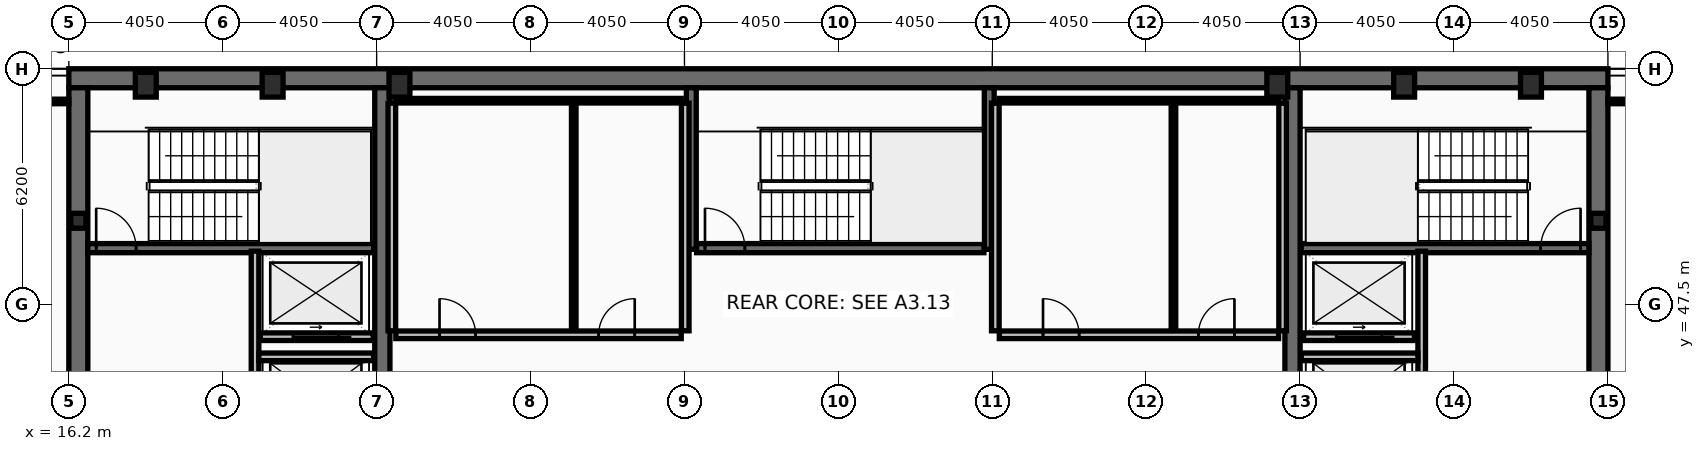
"""IFC4 building model, lengths in metres.
Left out: names, types, materials, properties, quantities, classifications, styles, units other than length and angle.
Written with IfcOpenShell. Run it as: python <this file> out.ifc"""

import sys

from ifc_helpers import new_model, si_unit, direction, frame, frame_2d, origin, origin_2d, place, context, subcontext, project, spatial, rectangle, hollow_rectangle, i_section, extrude, element, fill, save


model = new_model("IFC4")
c1 = context("Model", 3, precision=1e-05, world=origin(), true_north=direction((0.0, 1.0)))
c2 = subcontext(c1, "Body", "Model", "MODEL_VIEW")
j1 = project(units=[si_unit("LENGTHUNIT", "METRE"), si_unit("PLANEANGLEUNIT", "RADIAN")], contexts=[c1])
p1 = place(None, origin())
s1 = spatial("IfcSite", under=j1, at=p1, CompositionType="ELEMENT")
p2 = place(p1, origin())
s2 = spatial("IfcBuilding", under=s1, at=p2, CompositionType="ELEMENT")
p3 = place(p2, frame((0.0, 0.0, 314.6)))
s3 = spatial("IfcBuildingStorey", under=s2, at=p3, CompositionType="ELEMENT", Elevation=314.6)
p4 = place(p3, frame((16.2, 53.45, 0.0), z_axis=(0.0, 0.0, 1.0), x_axis=(1.0, 0.0, 0.0)))
e1 = element("IfcWall", 1, at=p4, inside=s3, PredefinedType="SHEAR", context=c2, shape_type="SweptSolid", body=[
    extrude(rectangle(XDim=40.5, YDim=0.5, at=frame_2d((20.25, 0.0))), origin(), (0.0, 0.0, 1.0), 3.44),
])
for number, where, z_axis, x_axis in (
    (2, (16.45, 41.8, 0.0), (0.0, 0.0, 1.0), (0.0, 1.0, 0.0)),
    (3, (56.45, 53.2, 0.0), (0.0, 0.0, 1.0), (0.0, -1.0, 0.0)),
):
    element("IfcWall", number, at=place(p3, frame(where, z_axis=z_axis, x_axis=x_axis)), inside=s3, PredefinedType="SHEAR", context=c2, shape_type="SweptSolid", body=[
        extrude(rectangle(XDim=11.4, YDim=0.5, at=frame_2d((5.7, 0.0))), origin(), (0.0, 0.0, 1.0), 3.44),
    ])
for number, where, z_axis, x_axis in (
    (4, (24.45, 41.8, 0.0), (0.0, 0.0, 1.0), (0.0, 1.0, 0.0)),
    (5, (48.4, 41.8, 0.0), (0.0, 0.0, 1.0), (0.0, 1.0, 0.0)),
):
    element("IfcWall", number, at=place(p3, frame(where, z_axis=z_axis, x_axis=x_axis)), inside=s3, PredefinedType="SHEAR", context=c2, shape_type="SweptSolid", body=[
        extrude(rectangle(XDim=11.4, YDim=0.4, at=frame_2d((5.7, 0.0))), origin(), (0.0, 0.0, 1.0), 3.44),
    ])
for number, where, z_axis, x_axis in (
    (6, (32.58, 48.95, 0.0), (0.0, 0.0, 1.0), (0.0, 1.0, 0.0)),
    (7, (40.42, 48.95, 0.0), (0.0, 0.0, 1.0), (0.0, 1.0, 0.0)),
):
    element("IfcWall", number, at=place(p3, frame(where, z_axis=z_axis, x_axis=x_axis)), inside=s3, PredefinedType="SHEAR", context=c2, shape_type="SweptSolid", body=[
        extrude(rectangle(XDim=4.25, YDim=0.26, at=frame_2d((2.125, 0.0))), origin(), (0.0, 0.0, 1.0), 3.44),
    ])
p5 = place(p3, frame((16.7, 48.98, 0.0), z_axis=(0.0, 0.0, 1.0), x_axis=(1.0, 0.0, 0.0)))
e8 = element("IfcWall", 8, at=p5, inside=s3, PredefinedType="SHEAR", context=c2, shape_type="SweptSolid", body=[
    extrude(rectangle(XDim=7.52, YDim=0.24, at=frame_2d((3.76, 0.0))), origin(), (0.0, 0.0, 1.0), 3.44),
])
p6 = place(p5, frame((0.22, 0.0, 0.0)))
e9 = element("IfcOpeningElement", 9, at=p6, cuts=e8, PredefinedType="OPENING", context=c2, shape_type="SweptSolid", body=[
    extrude(rectangle(XDim=1.05, YDim=2.15, at=frame_2d((0.525, 1.075))), frame((0.0, 0.13, 0.0), z_axis=(0.0, -1.0, 0.0), x_axis=(1.0, 0.0, 0.0)), (0.0, 0.0, 1.0), 0.26),
])
p7 = place(p3, frame((48.63, 48.98, 0.0), z_axis=(0.0, 0.0, 1.0), x_axis=(1.0, 0.0, 0.0)))
e10 = element("IfcWall", 10, at=p7, inside=s3, PredefinedType="SHEAR", context=c2, shape_type="SweptSolid", body=[
    extrude(rectangle(XDim=7.57, YDim=0.24, at=frame_2d((3.785, 0.0))), origin(), (0.0, 0.0, 1.0), 3.44),
])
p8 = place(p7, frame((6.3, 0.0, 0.0)))
e11 = element("IfcOpeningElement", 11, at=p8, cuts=e10, PredefinedType="OPENING", context=c2, shape_type="SweptSolid", body=[
    extrude(rectangle(XDim=1.05, YDim=2.15, at=frame_2d((0.525, 1.075))), frame((0.0, 0.13, 0.0), z_axis=(0.0, -1.0, 0.0), x_axis=(1.0, 0.0, 0.0)), (0.0, 0.0, 1.0), 0.26),
])
p9 = place(p3, frame((32.72, 48.98, 0.0), z_axis=(0.0, 0.0, 1.0), x_axis=(1.0, 0.0, 0.0)))
e12 = element("IfcWall", 12, at=p9, inside=s3, PredefinedType="SHEAR", context=c2, shape_type="SweptSolid", body=[
    extrude(rectangle(XDim=7.56, YDim=0.24, at=frame_2d((3.78, 0.0))), origin(), (0.0, 0.0, 1.0), 3.44),
])
p10 = place(p9, frame((0.22, 0.0, 0.0)))
e13 = element("IfcOpeningElement", 13, at=p10, cuts=e12, PredefinedType="OPENING", context=c2, shape_type="SweptSolid", body=[
    extrude(rectangle(XDim=1.05, YDim=2.15, at=frame_2d((0.525, 1.075))), frame((0.0, 0.13, 0.0), z_axis=(0.0, -1.0, 0.0), x_axis=(1.0, 0.0, 0.0)), (0.0, 0.0, 1.0), 0.26),
])
for number, where, z_axis, x_axis in (
    (14, (18.225, 53.28, 0.0), (0.0, 0.0, 1.0), (1.0, 0.0, 0.0)),
    (15, (21.562, 53.28, 0.0), (0.0, 0.0, 1.0), (1.0, 0.0, 0.0)),
    (16, (24.9, 53.28, 0.0), (0.0, 0.0, 1.0), (1.0, 0.0, 0.0)),
    (17, (48.0, 53.28, 0.0), (0.0, 0.0, 1.0), (1.0, 0.0, 0.0)),
    (18, (51.337, 53.28, 0.0), (0.0, 0.0, 1.0), (1.0, 0.0, 0.0)),
    (19, (54.675, 53.28, 0.0), (0.0, 0.0, 1.0), (1.0, 0.0, 0.0)),
):
    element("IfcColumn", number, at=place(p3, frame(where, z_axis=z_axis, x_axis=x_axis)), inside=s3, PredefinedType="COLUMN", context=c2, shape_type="SweptSolid", body=[
        extrude(hollow_rectangle(XDim=0.55, YDim=0.65, WallThickness=0.04, at=origin_2d()), origin(), (0.0, 0.0, 1.0), 3.6),
    ])
for number, where, z_axis, x_axis in (
    (20, (16.45, 49.7, 0.0), (0.0, 0.0, 1.0), (1.0, 0.0, 0.0)),
    (21, (56.45, 49.7, 0.0), (0.0, 0.0, 1.0), (1.0, 0.0, 0.0)),
):
    element("IfcColumn", number, at=place(p3, frame(where, z_axis=z_axis, x_axis=x_axis)), inside=s3, PredefinedType="COLUMN", context=c2, shape_type="SweptSolid", body=[
        extrude(i_section(OverallWidth=0.399, OverallDepth=0.393, WebThickness=0.023, FlangeThickness=0.037, at=origin_2d()), origin(), (0.0, 0.0, 1.0), 3.6),
    ])
p11 = place(p3, frame((51.61, 46.65, 0.0), z_axis=(0.0, 0.0, 1.0), x_axis=(-1.0, 0.0, 0.0)))
e22 = element("IfcWall", 22, at=p11, inside=s3, PredefinedType="PARTITIONING", context=c2, shape_type="SweptSolid", body=[
    extrude(rectangle(XDim=2.92, YDim=0.2, at=frame_2d((1.46, 0.0))), origin(), (0.0, 0.0, 1.0), 3.44),
])
p12 = place(p11, frame((0.86, 0.0, 0.0)))
e23 = element("IfcOpeningElement", 23, at=p12, cuts=e22, PredefinedType="OPENING", context=c2, shape_type="SweptSolid", body=[
    extrude(rectangle(XDim=1.2, YDim=2.18, at=frame_2d((0.6, 1.09))), frame((0.0, 0.11, 0.0), z_axis=(0.0, -1.0, 0.0), x_axis=(1.0, 0.0, 0.0)), (0.0, 0.0, 1.0), 0.22),
])
p13 = place(p3, frame((24.21, 46.65, 0.0), z_axis=(0.0, 0.0, 1.0), x_axis=(-1.0, 0.0, 0.0)))
e24 = element("IfcWall", 24, at=p13, inside=s3, PredefinedType="PARTITIONING", context=c2, shape_type="SweptSolid", body=[
    extrude(rectangle(XDim=2.97, YDim=0.2, at=frame_2d((1.485, 0.0))), origin(), (0.0, 0.0, 1.0), 3.44),
])
p14 = place(p13, frame((0.91, 0.0, 0.0)))
e25 = element("IfcOpeningElement", 25, at=p14, cuts=e24, PredefinedType="OPENING", context=c2, shape_type="SweptSolid", body=[
    extrude(rectangle(XDim=1.2, YDim=2.18, at=frame_2d((0.6, 1.09))), frame((0.0, 0.11, 0.0), z_axis=(0.0, -1.0, 0.0), x_axis=(1.0, 0.0, 0.0)), (0.0, 0.0, 1.0), 0.22),
])
p15 = place(p3, frame((21.1, 44.6, 0.0), z_axis=(0.0, 0.0, 1.0), x_axis=(0.0, 1.0, 0.0)))
e26 = element("IfcWall", 26, at=p15, inside=s3, PredefinedType="PARTITIONING", context=c2, shape_type="SweptSolid", body=[
    extrude(rectangle(XDim=4.3, YDim=0.2, at=frame_2d((2.15, 0.0))), origin(), (0.0, 0.0, 1.0), 3.44),
])
p16 = place(p3, frame((21.2, 46.12, 0.0), z_axis=(0.0, 0.0, 1.0), x_axis=(1.0, 0.0, 0.0)))
e27 = element("IfcWall", 27, at=p16, inside=s3, PredefinedType="PARTITIONING", context=c2, shape_type="SweptSolid", body=[
    extrude(rectangle(XDim=3.02, YDim=0.2, at=frame_2d((1.51, 0.0))), origin(), (0.0, 0.0, 1.0), 3.44),
])
p17 = place(p3, frame((51.8, 44.6, 0.0), z_axis=(0.0, 0.0, 1.0), x_axis=(0.0, 1.0, 0.0)))
e28 = element("IfcWall", 28, at=p17, inside=s3, PredefinedType="PARTITIONING", context=c2, shape_type="SweptSolid", body=[
    extrude(rectangle(XDim=4.3, YDim=0.2, at=frame_2d((2.15, 0.0))), origin(), (0.0, 0.0, 1.0), 3.44),
])
p18 = place(p3, frame((48.63, 46.12, 0.0), z_axis=(0.0, 0.0, 1.0), x_axis=(1.0, 0.0, 0.0)))
e29 = element("IfcWall", 29, at=p18, inside=s3, PredefinedType="PARTITIONING", context=c2, shape_type="SweptSolid", body=[
    extrude(rectangle(XDim=3.07, YDim=0.2, at=frame_2d((1.535, 0.0))), origin(), (0.0, 0.0, 1.0), 3.44),
])
for number, where, z_axis, x_axis in (
    (30, (24.7, 46.805, 0.0), (0.0, 0.0, 1.0), (0.0, 1.0, 0.0)),
    (31, (32.42, 46.805, 0.0), (0.0, 0.0, 1.0), (0.0, 1.0, 0.0)),
):
    element("IfcWall", number, at=place(p3, frame(where, z_axis=z_axis, x_axis=x_axis)), inside=s3, PredefinedType="PARTITIONING", context=c2, shape_type="SweptSolid", body=[
        extrude(rectangle(XDim=5.99, YDim=0.2, at=frame_2d((2.995, 0.0))), origin(), (0.0, 0.0, 1.0), 3.44),
    ])
p19 = place(p3, frame((24.805, 52.86, 0.0), z_axis=(0.0, 0.0, 1.0), x_axis=(1.0, 0.0, 0.0)))
e32 = element("IfcWall", 32, at=p19, inside=s3, PredefinedType="PARTITIONING", context=c2, shape_type="SweptSolid", body=[
    extrude(rectangle(XDim=7.51, YDim=0.12, at=frame_2d((3.755, 0.0))), origin(), (0.0, 0.0, 1.0), 3.44),
])
p20 = place(p3, frame((29.486, 46.805, 0.0), z_axis=(0.0, 0.0, 1.0), x_axis=(0.0, 1.0, 0.0)))
e33 = element("IfcWall", 33, at=p20, inside=s3, PredefinedType="PARTITIONING", context=c2, shape_type="SweptSolid", body=[
    extrude(rectangle(XDim=5.99, YDim=0.12, at=frame_2d((2.995, 0.0))), origin(), (0.0, 0.0, 1.0), 3.44),
])
p21 = place(p3, frame((24.805, 46.7, 0.0), z_axis=(0.0, 0.0, 1.0), x_axis=(1.0, 0.0, 0.0)))
e34 = element("IfcWall", 34, at=p21, inside=s3, PredefinedType="PARTITIONING", context=c2, shape_type="SweptSolid", body=[
    extrude(rectangle(XDim=7.51, YDim=0.2, at=frame_2d((3.755, 0.0))), origin(), (0.0, 0.0, 1.0), 3.44),
])
p22 = place(p21, frame((1.15, 0.0, 0.0)))
e35 = element("IfcOpeningElement", 35, at=p22, cuts=e34, PredefinedType="OPENING", context=c2, shape_type="SweptSolid", body=[
    extrude(rectangle(XDim=0.95, YDim=2.1, at=frame_2d((0.475, 1.05))), frame((0.0, 0.11, 0.0), z_axis=(0.0, -1.0, 0.0), x_axis=(1.0, 0.0, 0.0)), (0.0, 0.0, 1.0), 0.22),
])
p23 = place(p21, frame((5.336, 0.0, 0.0)))
e36 = element("IfcOpeningElement", 36, at=p23, cuts=e34, PredefinedType="OPENING", context=c2, shape_type="SweptSolid", body=[
    extrude(rectangle(XDim=0.95, YDim=2.1, at=frame_2d((0.475, 1.05))), frame((0.0, 0.11, 0.0), z_axis=(0.0, -1.0, 0.0), x_axis=(1.0, 0.0, 0.0)), (0.0, 0.0, 1.0), 0.22),
])
for number, where, z_axis, x_axis in (
    (37, (40.58, 46.805, 0.0), (0.0, 0.0, 1.0), (0.0, 1.0, 0.0)),
    (38, (48.14, 46.805, 0.0), (0.0, 0.0, 1.0), (0.0, 1.0, 0.0)),
):
    element("IfcWall", number, at=place(p3, frame(where, z_axis=z_axis, x_axis=x_axis)), inside=s3, PredefinedType="PARTITIONING", context=c2, shape_type="SweptSolid", body=[
        extrude(rectangle(XDim=5.99, YDim=0.2, at=frame_2d((2.995, 0.0))), origin(), (0.0, 0.0, 1.0), 3.44),
    ])
p24 = place(p3, frame((40.685, 52.86, 0.0), z_axis=(0.0, 0.0, 1.0), x_axis=(1.0, 0.0, 0.0)))
e39 = element("IfcWall", 39, at=p24, inside=s3, PredefinedType="PARTITIONING", context=c2, shape_type="SweptSolid", body=[
    extrude(rectangle(XDim=7.35, YDim=0.12, at=frame_2d((3.675, 0.0))), origin(), (0.0, 0.0, 1.0), 3.44),
])
p25 = place(p3, frame((45.267, 46.805, 0.0), z_axis=(0.0, 0.0, 1.0), x_axis=(0.0, 1.0, 0.0)))
e40 = element("IfcWall", 40, at=p25, inside=s3, PredefinedType="PARTITIONING", context=c2, shape_type="SweptSolid", body=[
    extrude(rectangle(XDim=5.99, YDim=0.12, at=frame_2d((2.995, 0.0))), origin(), (0.0, 0.0, 1.0), 3.44),
])
p26 = place(p3, frame((40.685, 46.7, 0.0), z_axis=(0.0, 0.0, 1.0), x_axis=(1.0, 0.0, 0.0)))
e41 = element("IfcWall", 41, at=p26, inside=s3, PredefinedType="PARTITIONING", context=c2, shape_type="SweptSolid", body=[
    extrude(rectangle(XDim=7.35, YDim=0.2, at=frame_2d((3.675, 0.0))), origin(), (0.0, 0.0, 1.0), 3.44),
])
p27 = place(p26, frame((1.15, 0.0, 0.0)))
e42 = element("IfcOpeningElement", 42, at=p27, cuts=e41, PredefinedType="OPENING", context=c2, shape_type="SweptSolid", body=[
    extrude(rectangle(XDim=0.95, YDim=2.1, at=frame_2d((0.475, 1.05))), frame((0.0, 0.11, 0.0), z_axis=(0.0, -1.0, 0.0), x_axis=(1.0, 0.0, 0.0)), (0.0, 0.0, 1.0), 0.22),
])
p28 = place(p26, frame((5.237, 0.0, 0.0)))
e43 = element("IfcOpeningElement", 43, at=p28, cuts=e41, PredefinedType="OPENING", context=c2, shape_type="SweptSolid", body=[
    extrude(rectangle(XDim=0.95, YDim=2.1, at=frame_2d((0.475, 1.05))), frame((0.0, 0.11, 0.0), z_axis=(0.0, -1.0, 0.0), x_axis=(1.0, 0.0, 0.0)), (0.0, 0.0, 1.0), 0.22),
])
for number, where, z_axis, x_axis in (
    (44, (12.095, 52.84, 0.0), (0.0, 0.0, 1.0), (1.0, 0.0, 0.0)),
    (45, (56.7, 52.84, 0.0), (0.0, 0.0, 1.0), (1.0, 0.0, 0.0)),
):
    element("IfcWall", number, at=place(p3, frame(where, z_axis=z_axis, x_axis=x_axis)), inside=s3, PredefinedType="PARTITIONING", context=c2, shape_type="SweptSolid", body=[
        extrude(rectangle(XDim=4.105, YDim=0.12, at=frame_2d((2.052, 0.0))), origin(), (0.0, 0.0, 1.0), 3.44),
    ])
p29 = place(p6, origin())
e46 = element("IfcDoor", 46, at=p29, inside=s3, OperationType="SINGLE_SWING_LEFT", PredefinedType="DOOR", context=c2, shape_type="SweptSolid", body=[
    extrude(rectangle(XDim=1.05, YDim=2.15, at=frame_2d((0.525, 1.075))), frame((0.0, 0.025, 0.0), z_axis=(0.0, -1.0, 0.0), x_axis=(1.0, 0.0, 0.0)), (0.0, 0.0, 1.0), 0.05),
])
fill(e9, e46)
p30 = place(p8, origin())
e47 = element("IfcDoor", 47, at=p30, inside=s3, OperationType="SINGLE_SWING_RIGHT", PredefinedType="DOOR", context=c2, shape_type="SweptSolid", body=[
    extrude(rectangle(XDim=1.05, YDim=2.15, at=frame_2d((0.525, 1.075))), frame((0.0, 0.025, 0.0), z_axis=(0.0, -1.0, 0.0), x_axis=(1.0, 0.0, 0.0)), (0.0, 0.0, 1.0), 0.05),
])
fill(e11, e47)
p31 = place(p10, origin())
e48 = element("IfcDoor", 48, at=p31, inside=s3, OperationType="SINGLE_SWING_LEFT", PredefinedType="DOOR", context=c2, shape_type="SweptSolid", body=[
    extrude(rectangle(XDim=1.05, YDim=2.15, at=frame_2d((0.525, 1.075))), frame((0.0, 0.025, 0.0), z_axis=(0.0, -1.0, 0.0), x_axis=(1.0, 0.0, 0.0)), (0.0, 0.0, 1.0), 0.05),
])
fill(e13, e48)
p32 = place(p12, origin())
e49 = element("IfcDoor", 49, at=p32, inside=s3, OperationType="SLIDING_TO_LEFT", PredefinedType="DOOR", context=c2, shape_type="SweptSolid", body=[
    extrude(rectangle(XDim=1.2, YDim=2.18, at=frame_2d((0.6, 1.09))), frame((0.0, 0.025, 0.0), z_axis=(0.0, -1.0, 0.0), x_axis=(1.0, 0.0, 0.0)), (0.0, 0.0, 1.0), 0.05),
])
fill(e23, e49)
p33 = place(p14, origin())
e50 = element("IfcDoor", 50, at=p33, inside=s3, OperationType="SLIDING_TO_LEFT", PredefinedType="DOOR", context=c2, shape_type="SweptSolid", body=[
    extrude(rectangle(XDim=1.2, YDim=2.18, at=frame_2d((0.6, 1.09))), frame((0.0, 0.025, 0.0), z_axis=(0.0, -1.0, 0.0), x_axis=(1.0, 0.0, 0.0)), (0.0, 0.0, 1.0), 0.05),
])
fill(e25, e50)
p34 = place(p22, origin())
e51 = element("IfcDoor", 51, at=p34, inside=s3, OperationType="SINGLE_SWING_LEFT", PredefinedType="DOOR", context=c2, shape_type="SweptSolid", body=[
    extrude(rectangle(XDim=0.95, YDim=2.1, at=frame_2d((0.475, 1.05))), frame((0.0, 0.025, 0.0), z_axis=(0.0, -1.0, 0.0), x_axis=(1.0, 0.0, 0.0)), (0.0, 0.0, 1.0), 0.05),
])
fill(e35, e51)
p35 = place(p23, origin())
e52 = element("IfcDoor", 52, at=p35, inside=s3, OperationType="SINGLE_SWING_RIGHT", PredefinedType="DOOR", context=c2, shape_type="SweptSolid", body=[
    extrude(rectangle(XDim=0.95, YDim=2.1, at=frame_2d((0.475, 1.05))), frame((0.0, 0.025, 0.0), z_axis=(0.0, -1.0, 0.0), x_axis=(1.0, 0.0, 0.0)), (0.0, 0.0, 1.0), 0.05),
])
fill(e36, e52)
p36 = place(p27, origin())
e53 = element("IfcDoor", 53, at=p36, inside=s3, OperationType="SINGLE_SWING_LEFT", PredefinedType="DOOR", context=c2, shape_type="SweptSolid", body=[
    extrude(rectangle(XDim=0.95, YDim=2.1, at=frame_2d((0.475, 1.05))), frame((0.0, 0.025, 0.0), z_axis=(0.0, -1.0, 0.0), x_axis=(1.0, 0.0, 0.0)), (0.0, 0.0, 1.0), 0.05),
])
fill(e42, e53)
p37 = place(p28, origin())
e54 = element("IfcDoor", 54, at=p37, inside=s3, OperationType="SINGLE_SWING_RIGHT", PredefinedType="DOOR", context=c2, shape_type="SweptSolid", body=[
    extrude(rectangle(XDim=0.95, YDim=2.1, at=frame_2d((0.475, 1.05))), frame((0.0, 0.025, 0.0), z_axis=(0.0, -1.0, 0.0), x_axis=(1.0, 0.0, 0.0)), (0.0, 0.0, 1.0), 0.05),
])
fill(e43, e54)
save(model, sys.argv[1])
